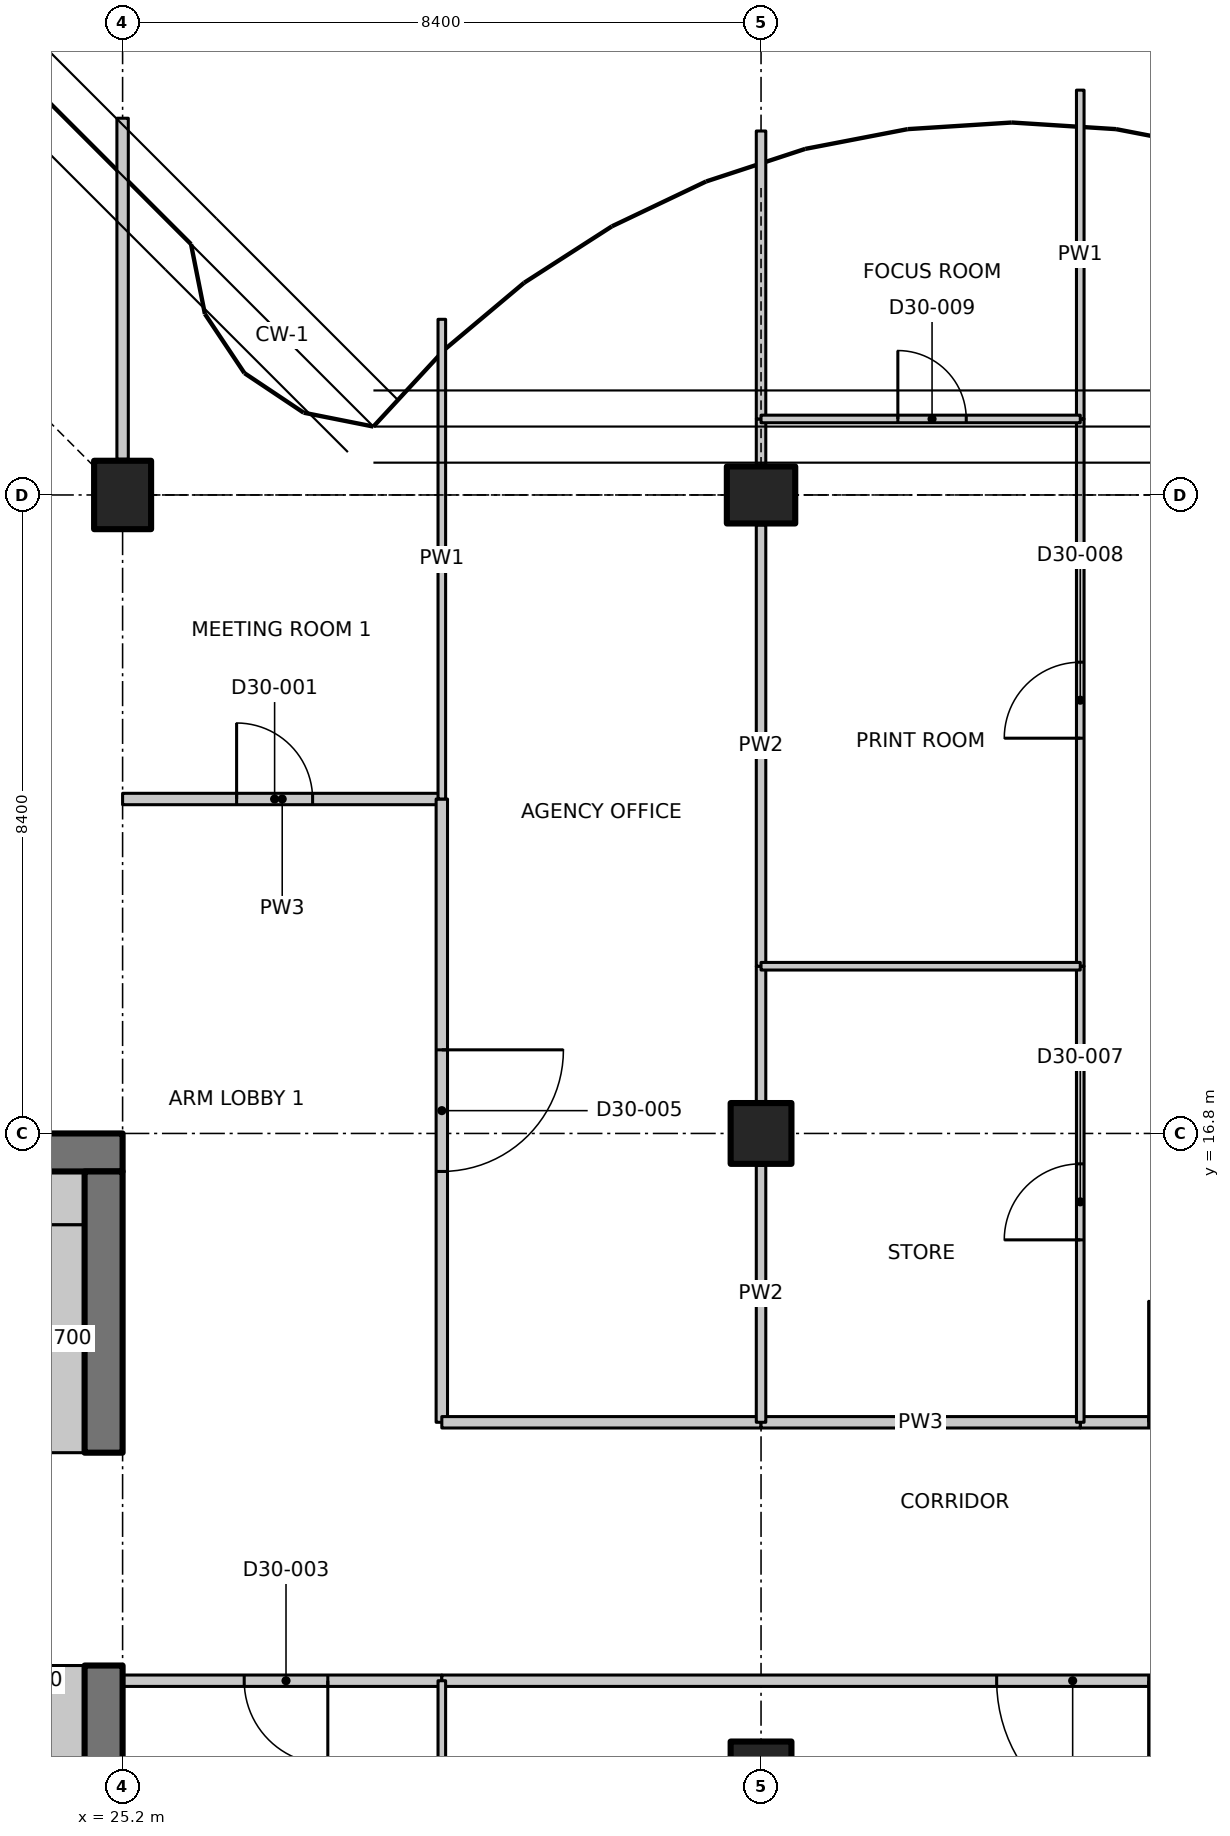
"""IFC4 building model, lengths in metres.
Left out: names, types, materials, properties, quantities, classifications, styles, units other than length and angle.
Written with IfcOpenShell. Run it as: python <this file> out.ifc"""

import sys

from ifc_helpers import new_model, si_unit, direction, frame, frame_2d, origin, origin_2d, place, context, subcontext, project, spatial, polyline, rectangle, outline, extrude, element, fill, save


model = new_model("IFC4")
c1 = context("Model", 3, precision=1e-05, world=origin(), true_north=direction((0.0, 1.0)))
c2 = subcontext(c1, "Body", "Model", "MODEL_VIEW")
j1 = project(units=[si_unit("LENGTHUNIT", "METRE"), si_unit("PLANEANGLEUNIT", "RADIAN")], contexts=[c1])
p1 = place(None, origin())
s1 = spatial("IfcSite", under=j1, at=p1, CompositionType="ELEMENT")
p2 = place(p1, origin())
s2 = spatial("IfcBuilding", under=s1, at=p2, CompositionType="ELEMENT")
p3 = place(p2, frame((0.0, 0.0, 248.1)))
s3 = spatial("IfcBuildingStorey", under=s2, at=p3, CompositionType="ELEMENT", Elevation=248.1)
p4 = place(p3, frame((25.2, 25.2, 0.0), z_axis=(0.0, 0.0, 1.0), x_axis=(1.0, 0.0, 0.0)))
e1 = element("IfcColumn", 1, at=p4, inside=s3, PredefinedType="COLUMN", context=c2, shape_type="SweptSolid", body=[
    extrude(rectangle(XDim=0.75, YDim=0.9, at=origin_2d()), origin(), (0.0, 0.0, 1.0), 3.35),
])
for number, where, z_axis, x_axis in (
    (2, (33.6, 8.4, 0.0), (0.0, 0.0, 1.0), (1.0, 0.0, 0.0)),
    (3, (33.6, 16.8, 0.0), (0.0, 0.0, 1.0), (1.0, 0.0, 0.0)),
):
    element("IfcColumn", number, at=place(p3, frame(where, z_axis=z_axis, x_axis=x_axis)), inside=s3, PredefinedType="COLUMN", context=c2, shape_type="SweptSolid", body=[
        extrude(rectangle(XDim=0.8, YDim=0.8, at=origin_2d()), origin(), (0.0, 0.0, 1.0), 3.35),
    ])
p5 = place(p3, frame((33.6, 25.2, 0.0), z_axis=(0.0, 0.0, 1.0), x_axis=(0.0, 1.0, 0.0)))
e4 = element("IfcColumn", 4, at=p5, inside=s3, PredefinedType="COLUMN", context=c2, shape_type="SweptSolid", body=[
    extrude(rectangle(XDim=0.75, YDim=0.9, at=origin_2d()), origin(), (0.0, 0.0, 1.0), 3.35),
])
p6 = place(p3, frame((23.8, 16.55, 0.0), z_axis=(0.0, 0.0, 1.0), x_axis=(1.0, 0.0, 0.0)))
e5 = element("IfcWall", 5, at=p6, inside=s3, PredefinedType="SHEAR", context=c2, shape_type="SweptSolid", body=[
    extrude(rectangle(XDim=1.4, YDim=0.5, at=frame_2d((0.7, 0.0))), origin(), (0.0, 0.0, 1.0), 3.35),
])
p7 = place(p3, frame((24.95, 0.5, 0.0), z_axis=(0.0, 0.0, 1.0), x_axis=(0.0, 1.0, 0.0)))
e6 = element("IfcWall", 6, at=p7, inside=s3, PredefinedType="SHEAR", context=c2, shape_type="SweptSolid", body=[
    extrude(rectangle(XDim=9.3, YDim=0.5, at=frame_2d((4.65, 0.0))), origin(), (0.0, 0.0, 1.0), 3.35),
])
p8 = place(p3, frame((24.95, 12.6, 0.0), z_axis=(0.0, 0.0, 1.0), x_axis=(0.0, 1.0, 0.0)))
e7 = element("IfcWall", 7, at=p8, inside=s3, PredefinedType="SHEAR", context=c2, shape_type="SweptSolid", body=[
    extrude(rectangle(XDim=3.7, YDim=0.5, at=frame_2d((1.85, 0.0))), origin(), (0.0, 0.0, 1.0), 3.35),
])
p9 = place(p3, frame((24.35, 12.6, 0.0), z_axis=(0.0, 0.0, 1.0), x_axis=(0.0, 1.0, 0.0)))
e8 = element("IfcWall", 8, at=p9, inside=s3, PredefinedType="PARTITIONING", context=c2, shape_type="SweptSolid", body=[
    extrude(rectangle(XDim=3.0, YDim=0.7, at=frame_2d((1.5, 0.0))), origin(), (0.0, 0.0, 1.0), 3.35),
])
p10 = place(p3, frame((23.8, 15.95, 0.0), z_axis=(0.0, 0.0, 1.0), x_axis=(1.0, 0.0, 0.0)))
e9 = element("IfcWall", 9, at=p10, inside=s3, PredefinedType="PARTITIONING", context=c2, shape_type="SweptSolid", body=[
    extrude(rectangle(XDim=0.9, YDim=0.7, at=frame_2d((0.45, 0.0))), origin(), (0.0, 0.0, 1.0), 3.35),
])
p11 = place(p3, frame((24.35, 4.35, 0.0), z_axis=(0.0, 0.0, 1.0), x_axis=(0.0, 1.0, 0.0)))
e10 = element("IfcWall", 10, at=p11, inside=s3, PredefinedType="PARTITIONING", context=c2, shape_type="SweptSolid", body=[
    extrude(rectangle(XDim=5.45, YDim=0.7, at=frame_2d((2.725, 0.0))), origin(), (0.0, 0.0, 1.0), 3.35),
])
p12 = place(p3, frame((25.2, 21.2, 0.0), z_axis=(0.0, 0.0, 1.0), x_axis=(1.0, 0.0, 0.0)))
e11 = element("IfcWall", 11, at=p12, inside=s3, PredefinedType="PARTITIONING", context=c2, shape_type="SweptSolid", body=[
    extrude(rectangle(XDim=4.2, YDim=0.15, at=frame_2d((2.1, 0.0))), origin(), (0.0, 0.0, 1.0), 3.33),
])
p13 = place(p12, frame((1.5, 0.0, 0.0)))
e12 = element("IfcOpeningElement", 12, at=p13, cuts=e11, PredefinedType="OPENING", context=c2, shape_type="SweptSolid", body=[
    extrude(rectangle(XDim=1.0, YDim=2.1, at=frame_2d((0.5, 1.05))), frame((0.0, 0.085, 0.0), z_axis=(0.0, -1.0, 0.0), x_axis=(1.0, 0.0, 0.0)), (0.0, 0.0, 1.0), 0.17),
])
p14 = place(p3, frame((29.4, 9.6, 0.0), z_axis=(0.0, 0.0, 1.0), x_axis=(-1.0, 0.0, 0.0)))
e13 = element("IfcWall", 13, at=p14, inside=s3, PredefinedType="PARTITIONING", context=c2, shape_type="SweptSolid", body=[
    extrude(rectangle(XDim=4.2, YDim=0.15, at=frame_2d((2.1, 0.0))), origin(), (0.0, 0.0, 1.0), 3.33),
])
p15 = place(p14, frame((1.5, 0.0, 0.0)))
e14 = element("IfcOpeningElement", 14, at=p15, cuts=e13, PredefinedType="OPENING", context=c2, shape_type="SweptSolid", body=[
    extrude(rectangle(XDim=1.1, YDim=2.1, at=frame_2d((0.55, 1.05))), frame((0.0, 0.085, 0.0), z_axis=(0.0, -1.0, 0.0), x_axis=(1.0, 0.0, 0.0)), (0.0, 0.0, 1.0), 0.17),
])
p16 = place(p3, frame((29.4, 21.2, 0.0), z_axis=(0.0, 0.0, 1.0), x_axis=(0.0, -1.0, 0.0)))
e15 = element("IfcWall", 15, at=p16, inside=s3, PredefinedType="PARTITIONING", context=c2, shape_type="SweptSolid", body=[
    extrude(rectangle(XDim=8.2, YDim=0.15, at=frame_2d((4.1, 0.0))), origin(), (0.0, 0.0, 1.0), 3.33),
])
p17 = place(p16, frame((3.3, 0.0, 0.0)))
e16 = element("IfcOpeningElement", 16, at=p17, cuts=e15, PredefinedType="OPENING", context=c2, shape_type="SweptSolid", body=[
    extrude(rectangle(XDim=1.6, YDim=2.1, at=frame_2d((0.8, 1.05))), frame((0.0, 0.085, 0.0), z_axis=(0.0, -1.0, 0.0), x_axis=(1.0, 0.0, 0.0)), (0.0, 0.0, 1.0), 0.17),
])
p18 = place(p3, frame((29.4, 27.511, 0.0), z_axis=(0.0, 0.0, 1.0), x_axis=(0.0, -1.0, 0.0)))
e17 = element("IfcWall", 17, at=p18, inside=s3, PredefinedType="PARTITIONING", context=c2, shape_type="SweptSolid", body=[
    extrude(outline(polyline([(0.0, 0.0), (6.311, 0.0), (6.311, 3.33), (2.761, 3.33), (2.759, 2.98), (1.863, 2.98), (1.861, 3.33), (0.236, 3.33), (0.0, 3.33), (0.0, 0.0)])), frame((0.0, 0.05, 0.0), z_axis=(0.0, -1.0, 0.0), x_axis=(1.0, 0.0, 0.0)), (0.0, 0.0, 1.0), 0.1),
])
p19 = place(p3, frame((25.2, 25.67, 0.0), z_axis=(0.0, 0.0, 1.0), x_axis=(0.0, 1.0, 0.0)))
e18 = element("IfcWall", 18, at=p19, inside=s3, PredefinedType="PARTITIONING", context=c2, shape_type="SweptSolid", body=[
    extrude(rectangle(XDim=4.487, YDim=0.15, at=frame_2d((2.243, 0.0))), origin(), (0.0, 0.0, 1.0), 2.98),
])
p20 = place(p3, frame((46.2, 9.6, 0.0), z_axis=(0.0, 0.0, 1.0), x_axis=(-1.0, 0.0, 0.0)))
e19 = element("IfcWall", 19, at=p20, inside=s3, PredefinedType="PARTITIONING", context=c2, shape_type="SweptSolid", body=[
    extrude(rectangle(XDim=16.8, YDim=0.15, at=frame_2d((8.4, 0.0))), origin(), (0.0, 0.0, 1.0), 3.33),
])
p21 = place(p20, frame((7.5, 0.0, 0.0)))
e20 = element("IfcOpeningElement", 20, at=p21, cuts=e19, PredefinedType="OPENING", context=c2, shape_type="SweptSolid", body=[
    extrude(rectangle(XDim=2.0, YDim=2.4, at=frame_2d((1.0, 1.2))), frame((0.0, 0.085, 0.0), z_axis=(0.0, -1.0, 0.0), x_axis=(1.0, 0.0, 0.0)), (0.0, 0.0, 1.0), 0.17),
])
p22 = place(p3, frame((29.4, 13.0, 0.0), z_axis=(0.0, 0.0, 1.0), x_axis=(1.0, 0.0, 0.0)))
e21 = element("IfcWall", 21, at=p22, inside=s3, PredefinedType="PARTITIONING", context=c2, shape_type="SweptSolid", body=[
    extrude(rectangle(XDim=4.2, YDim=0.15, at=frame_2d((2.1, 0.0))), origin(), (0.0, 0.0, 1.0), 3.33),
])
p23 = place(p3, frame((37.8, 13.0, 0.0), z_axis=(0.0, 0.0, 1.0), x_axis=(1.0, 0.0, 0.0)))
e22 = element("IfcWall", 22, at=p23, inside=s3, PredefinedType="PARTITIONING", context=c2, shape_type="SweptSolid", body=[
    extrude(rectangle(XDim=3.4, YDim=0.15, at=frame_2d((1.7, 0.0))), origin(), (0.0, 0.0, 1.0), 3.33),
])
p24 = place(p23, frame((0.9, 0.0, 0.0)))
e23 = element("IfcOpeningElement", 23, at=p24, cuts=e22, PredefinedType="OPENING", context=c2, shape_type="SweptSolid", body=[
    extrude(rectangle(XDim=1.6, YDim=2.1, at=frame_2d((0.8, 1.05))), frame((0.0, 0.085, 0.0), z_axis=(0.0, -1.0, 0.0), x_axis=(1.0, 0.0, 0.0)), (0.0, 0.0, 1.0), 0.17),
])
p25 = place(p3, frame((33.6, 13.0, 0.0), z_axis=(0.0, 0.0, 1.0), x_axis=(1.0, 0.0, 0.0)))
e24 = element("IfcWall", 24, at=p25, inside=s3, PredefinedType="PARTITIONING", context=c2, shape_type="SweptSolid", body=[
    extrude(rectangle(XDim=4.2, YDim=0.15, at=frame_2d((2.1, 0.0))), origin(), (0.0, 0.0, 1.0), 3.33),
])
p26 = place(p3, frame((29.4, 9.6, 0.0), z_axis=(0.0, 0.0, 1.0), x_axis=(0.0, -1.0, 0.0)))
e25 = element("IfcWall", 25, at=p26, inside=s3, PredefinedType="PARTITIONING", context=c2, shape_type="SweptSolid", body=[
    extrude(outline(polyline([(0.0, 0.0), (12.6, 0.0), (12.6, 3.33), (10.05, 3.33), (10.048, 2.98), (9.152, 2.98), (9.15, 3.33), (0.0, 3.33), (0.0, 0.0)])), frame((0.0, 0.05, 0.0), z_axis=(0.0, -1.0, 0.0), x_axis=(1.0, 0.0, 0.0)), (0.0, 0.0, 1.0), 0.1),
])
p27 = place(p3, frame((33.6, 19.0, 0.0), z_axis=(0.0, 0.0, 1.0), x_axis=(0.0, -1.0, 0.0)))
e26 = element("IfcWall", 26, at=p27, inside=s3, PredefinedType="PARTITIONING", context=c2, shape_type="SweptSolid", body=[
    extrude(rectangle(XDim=1.78, YDim=0.125, at=frame_2d((0.89, 0.0))), origin(), (0.0, 0.0, 1.0), 3.33),
])
p28 = place(p3, frame((33.6, 16.38, 0.0), z_axis=(0.0, 0.0, 1.0), x_axis=(0.0, -1.0, 0.0)))
e27 = element("IfcWall", 27, at=p28, inside=s3, PredefinedType="PARTITIONING", context=c2, shape_type="SweptSolid", body=[
    extrude(rectangle(XDim=3.38, YDim=0.125, at=frame_2d((1.69, 0.0))), origin(), (0.0, 0.0, 1.0), 3.33),
])
p29 = place(p3, frame((33.6, 26.2, 0.0), z_axis=(0.0, 0.0, 1.0), x_axis=(0.0, -1.0, 0.0)))
e28 = element("IfcWall", 28, at=p29, inside=s3, PredefinedType="PARTITIONING", context=c2, shape_type="SweptSolid", body=[
    extrude(rectangle(XDim=0.605, YDim=0.125, at=frame_2d((0.302, 0.0))), origin(), (0.0, 0.0, 1.0), 2.98),
])
p30 = place(p3, frame((33.6, 24.805, 0.0), z_axis=(0.0, 0.0, 1.0), x_axis=(0.0, -1.0, 0.0)))
e29 = element("IfcWall", 29, at=p30, inside=s3, PredefinedType="PARTITIONING", context=c2, shape_type="SweptSolid", body=[
    extrude(outline(polyline([(0.0, 0.0), (5.805, 0.0), (5.805, 3.33), (0.055, 3.33), (0.053, 2.98), (0.0, 2.98), (0.0, 0.0)])), frame((0.0, 0.062, 0.0), z_axis=(0.0, -1.0, 0.0), x_axis=(1.0, 0.0, 0.0)), (0.0, 0.0, 1.0), 0.125),
])
p31 = place(p3, frame((33.6, 29.988, 0.0), z_axis=(0.0, 0.0, 1.0), x_axis=(0.0, -1.0, 0.0)))
e30 = element("IfcWall", 30, at=p31, inside=s3, PredefinedType="PARTITIONING", context=c2, shape_type="SweptSolid", body=[
    extrude(rectangle(XDim=3.788, YDim=0.125, at=frame_2d((1.894, 0.0))), origin(), (0.0, 0.0, 1.0), 2.98),
])
p32 = place(p3, frame((37.8, 13.0, 0.0), z_axis=(0.0, 0.0, 1.0), x_axis=(0.0, 1.0, 0.0)))
e31 = element("IfcWall", 31, at=p32, inside=s3, PredefinedType="PARTITIONING", context=c2, shape_type="SweptSolid", body=[
    extrude(rectangle(XDim=6.0, YDim=0.1, at=frame_2d((3.0, 0.0))), origin(), (0.0, 0.0, 1.0), 3.33),
])
p33 = place(p32, frame((2.4, 0.0, 0.0)))
e32 = element("IfcOpeningElement", 32, at=p33, cuts=e31, PredefinedType="OPENING", context=c2, shape_type="SweptSolid", body=[
    extrude(rectangle(XDim=1.0, YDim=2.1, at=frame_2d((0.5, 1.05))), frame((0.0, 0.06, 0.0), z_axis=(0.0, -1.0, 0.0), x_axis=(1.0, 0.0, 0.0)), (0.0, 0.0, 1.0), 0.12),
])
p34 = place(p3, frame((37.8, 19.0, 0.0), z_axis=(0.0, 0.0, 1.0), x_axis=(0.0, 1.0, 0.0)))
e33 = element("IfcWall", 33, at=p34, inside=s3, PredefinedType="PARTITIONING", context=c2, shape_type="SweptSolid", body=[
    extrude(outline(polyline([(0.0, 0.0), (7.2, 0.0), (7.2, 3.33), (6.65, 3.33), (6.648, 2.98), (5.752, 2.98), (5.75, 3.33), (0.0, 3.33), (0.0, 0.0)])), frame((0.0, 0.05, 0.0), z_axis=(0.0, -1.0, 0.0), x_axis=(1.0, 0.0, 0.0)), (0.0, 0.0, 1.0), 0.1),
])
p35 = place(p34, frame((3.0, 0.0, 0.0)))
e34 = element("IfcOpeningElement", 34, at=p35, cuts=e33, PredefinedType="OPENING", context=c2, shape_type="SweptSolid", body=[
    extrude(rectangle(XDim=1.0, YDim=2.1, at=frame_2d((0.5, 1.05))), frame((0.0, 0.06, 0.0), z_axis=(0.0, -1.0, 0.0), x_axis=(1.0, 0.0, 0.0)), (0.0, 0.0, 1.0), 0.12),
])
p36 = place(p3, frame((37.8, 26.2, 0.0), z_axis=(0.0, 0.0, 1.0), x_axis=(0.0, 1.0, 0.0)))
e35 = element("IfcWall", 35, at=p36, inside=s3, PredefinedType="PARTITIONING", context=c2, shape_type="SweptSolid", body=[
    extrude(rectangle(XDim=4.326, YDim=0.1, at=frame_2d((2.163, 0.0))), origin(), (0.0, 0.0, 1.0), 3.33),
])
p37 = place(p3, frame((33.6, 19.0, 0.0), z_axis=(0.0, 0.0, 1.0), x_axis=(1.0, 0.0, 0.0)))
e36 = element("IfcWall", 36, at=p37, inside=s3, PredefinedType="PARTITIONING", context=c2, shape_type="SweptSolid", body=[
    extrude(rectangle(XDim=4.2, YDim=0.1, at=frame_2d((2.1, 0.0))), origin(), (0.0, 0.0, 1.0), 3.33),
])
p38 = place(p3, frame((33.6, 26.2, 0.0), z_axis=(0.0, 0.0, 1.0), x_axis=(1.0, 0.0, 0.0)))
e37 = element("IfcWall", 37, at=p38, inside=s3, PredefinedType="PARTITIONING", context=c2, shape_type="SweptSolid", body=[
    extrude(rectangle(XDim=4.2, YDim=0.1, at=frame_2d((2.1, 0.0))), origin(), (0.0, 0.0, 1.0), 2.98),
])
p39 = place(p38, frame((1.8, 0.0, 0.0)))
e38 = element("IfcOpeningElement", 38, at=p39, cuts=e37, PredefinedType="OPENING", context=c2, shape_type="SweptSolid", body=[
    extrude(rectangle(XDim=0.9, YDim=2.1, at=frame_2d((0.45, 1.05))), frame((0.0, 0.06, 0.0), z_axis=(0.0, -1.0, 0.0), x_axis=(1.0, 0.0, 0.0)), (0.0, 0.0, 1.0), 0.12),
])
p40 = place(p13, origin())
e39 = element("IfcDoor", 39, at=p40, inside=s3, OperationType="SINGLE_SWING_LEFT", PredefinedType="DOOR", context=c2, shape_type="SweptSolid", body=[
    extrude(rectangle(XDim=1.0, YDim=2.1, at=frame_2d((0.5, 1.05))), frame((0.0, 0.025, 0.0), z_axis=(0.0, -1.0, 0.0), x_axis=(1.0, 0.0, 0.0)), (0.0, 0.0, 1.0), 0.05),
])
fill(e12, e39)
p41 = place(p15, origin())
e40 = element("IfcDoor", 40, at=p41, inside=s3, OperationType="SINGLE_SWING_LEFT", PredefinedType="DOOR", context=c2, shape_type="SweptSolid", body=[
    extrude(rectangle(XDim=1.1, YDim=2.1, at=frame_2d((0.55, 1.05))), frame((0.0, 0.025, 0.0), z_axis=(0.0, -1.0, 0.0), x_axis=(1.0, 0.0, 0.0)), (0.0, 0.0, 1.0), 0.05),
])
fill(e14, e40)
p42 = place(p21, origin())
e41 = element("IfcDoor", 41, at=p42, inside=s3, OperationType="DOUBLE_DOOR_SINGLE_SWING", PredefinedType="DOOR", context=c2, shape_type="SweptSolid", body=[
    extrude(rectangle(XDim=2.0, YDim=2.4, at=frame_2d((1.0, 1.2))), frame((0.0, 0.025, 0.0), z_axis=(0.0, -1.0, 0.0), x_axis=(1.0, 0.0, 0.0)), (0.0, 0.0, 1.0), 0.05),
])
fill(e20, e41)
p43 = place(p17, origin())
e42 = element("IfcDoor", 42, at=p43, inside=s3, OperationType="DOUBLE_DOOR_SINGLE_SWING", PredefinedType="DOOR", context=c2, shape_type="SweptSolid", body=[
    extrude(rectangle(XDim=1.6, YDim=2.1, at=frame_2d((0.8, 1.05))), frame((0.0, 0.025, 0.0), z_axis=(0.0, -1.0, 0.0), x_axis=(1.0, 0.0, 0.0)), (0.0, 0.0, 1.0), 0.05),
])
fill(e16, e42)
p44 = place(p24, origin())
e43 = element("IfcDoor", 43, at=p44, inside=s3, OperationType="DOUBLE_DOOR_SINGLE_SWING", PredefinedType="DOOR", context=c2, shape_type="SweptSolid", body=[
    extrude(rectangle(XDim=1.6, YDim=2.1, at=frame_2d((0.8, 1.05))), frame((0.0, 0.025, 0.0), z_axis=(0.0, -1.0, 0.0), x_axis=(1.0, 0.0, 0.0)), (0.0, 0.0, 1.0), 0.05),
])
fill(e23, e43)
p45 = place(p33, origin())
e44 = element("IfcDoor", 44, at=p45, inside=s3, OperationType="SINGLE_SWING_LEFT", PredefinedType="DOOR", context=c2, shape_type="SweptSolid", body=[
    extrude(rectangle(XDim=1.0, YDim=2.1, at=frame_2d((0.5, 1.05))), frame((0.0, 0.025, 0.0), z_axis=(0.0, -1.0, 0.0), x_axis=(1.0, 0.0, 0.0)), (0.0, 0.0, 1.0), 0.05),
])
fill(e32, e44)
p46 = place(p35, origin())
e45 = element("IfcDoor", 45, at=p46, inside=s3, OperationType="SINGLE_SWING_LEFT", PredefinedType="DOOR", context=c2, shape_type="SweptSolid", body=[
    extrude(rectangle(XDim=1.0, YDim=2.1, at=frame_2d((0.5, 1.05))), frame((0.0, 0.025, 0.0), z_axis=(0.0, -1.0, 0.0), x_axis=(1.0, 0.0, 0.0)), (0.0, 0.0, 1.0), 0.05),
])
fill(e34, e45)
p47 = place(p39, origin())
e46 = element("IfcDoor", 46, at=p47, inside=s3, OperationType="SINGLE_SWING_LEFT", PredefinedType="DOOR", context=c2, shape_type="SweptSolid", body=[
    extrude(rectangle(XDim=0.9, YDim=2.1, at=frame_2d((0.45, 1.05))), frame((0.0, 0.025, 0.0), z_axis=(0.0, -1.0, 0.0), x_axis=(1.0, 0.0, 0.0)), (0.0, 0.0, 1.0), 0.05),
])
fill(e38, e46)
save(model, sys.argv[1])
